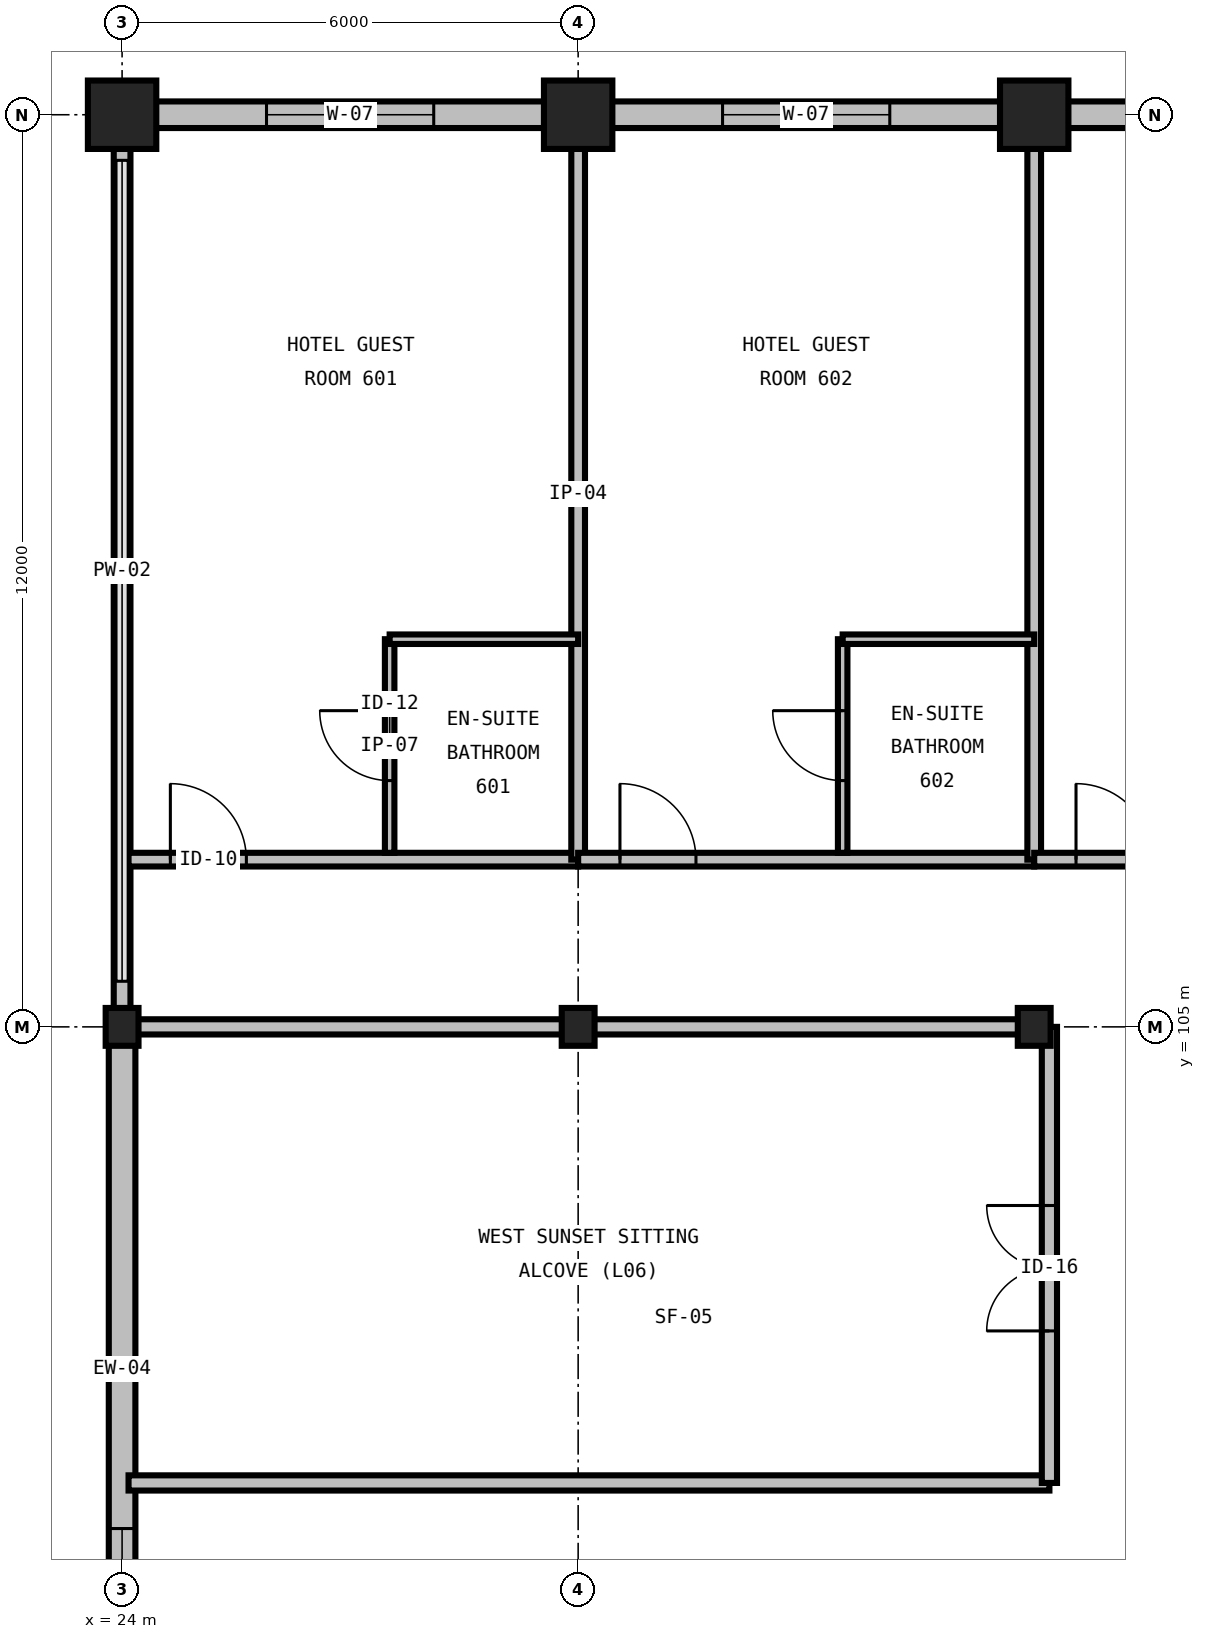
"""IFC4 building model, lengths in metres.
Left out: names, types, materials, properties, quantities, classifications, styles, units other than length and angle.
Written with IfcOpenShell. Run it as: python <this file> out.ifc"""

import sys

from ifc_helpers import new_model, si_unit, direction, frame, frame_2d, origin, origin_2d, place, context, subcontext, project, spatial, rectangle, i_section, extrude, element, fill, save


model = new_model("IFC4")
c1 = context("Model", 3, precision=1e-05, world=origin(), true_north=direction((0.0, 1.0)))
c2 = subcontext(c1, "Body", "Model", "MODEL_VIEW")
j1 = project(units=[si_unit("LENGTHUNIT", "METRE"), si_unit("PLANEANGLEUNIT", "RADIAN")], contexts=[c1])
p1 = place(None, origin())
s1 = spatial("IfcSite", under=j1, at=p1, CompositionType="ELEMENT")
p2 = place(p1, origin())
s2 = spatial("IfcBuilding", under=s1, at=p2, CompositionType="ELEMENT")
p3 = place(p2, frame((0.0, 0.0, 31.2)))
s3 = spatial("IfcBuildingStorey", under=s2, at=p3, CompositionType="ELEMENT", Elevation=31.2)
p4 = place(p3, frame((24.0, 105.0, 0.0), z_axis=(0.0, 0.0, 1.0), x_axis=(1.0, 0.0, 0.0)))
e1 = element("IfcColumn", 1, at=p4, inside=s3, PredefinedType="COLUMN", context=c2, shape_type="SweptSolid", body=[
    extrude(i_section(OverallWidth=0.432, OverallDepth=0.498, WebThickness=0.056, FlangeThickness=0.089, FilletRadius=0.031, at=origin_2d()), origin(), (0.0, 0.0, 1.0), 3.6),
])
p5 = place(p3, frame((24.0, 117.0, 0.0), z_axis=(0.0, 0.0, 1.0), x_axis=(1.0, 0.0, 0.0)))
e2 = element("IfcColumn", 2, at=p5, inside=s3, PredefinedType="COLUMN", context=c2, shape_type="SweptSolid", body=[
    extrude(rectangle(XDim=0.9, YDim=0.9, at=origin_2d()), origin(), (0.0, 0.0, 1.0), 3.6),
])
p6 = place(p3, frame((30.0, 105.0, 0.0), z_axis=(0.0, 0.0, 1.0), x_axis=(1.0, 0.0, 0.0)))
e3 = element("IfcColumn", 3, at=p6, inside=s3, PredefinedType="COLUMN", context=c2, shape_type="SweptSolid", body=[
    extrude(i_section(OverallWidth=0.432, OverallDepth=0.498, WebThickness=0.056, FlangeThickness=0.089, FilletRadius=0.031, at=origin_2d()), origin(), (0.0, 0.0, 1.0), 3.6),
])
p7 = place(p3, frame((30.0, 117.0, 0.0), z_axis=(0.0, 0.0, 1.0), x_axis=(1.0, 0.0, 0.0)))
e4 = element("IfcColumn", 4, at=p7, inside=s3, PredefinedType="COLUMN", context=c2, shape_type="SweptSolid", body=[
    extrude(rectangle(XDim=0.9, YDim=0.9, at=origin_2d()), origin(), (0.0, 0.0, 1.0), 3.6),
])
p8 = place(p3, frame((36.0, 105.0, 0.0), z_axis=(0.0, 0.0, 1.0), x_axis=(1.0, 0.0, 0.0)))
e5 = element("IfcColumn", 5, at=p8, inside=s3, PredefinedType="COLUMN", context=c2, shape_type="SweptSolid", body=[
    extrude(i_section(OverallWidth=0.432, OverallDepth=0.498, WebThickness=0.056, FlangeThickness=0.089, FilletRadius=0.031, at=origin_2d()), origin(), (0.0, 0.0, 1.0), 3.6),
])
p9 = place(p3, frame((36.0, 117.0, 0.0), z_axis=(0.0, 0.0, 1.0), x_axis=(1.0, 0.0, 0.0)))
e6 = element("IfcColumn", 6, at=p9, inside=s3, PredefinedType="COLUMN", context=c2, shape_type="SweptSolid", body=[
    extrude(rectangle(XDim=0.9, YDim=0.9, at=origin_2d()), origin(), (0.0, 0.0, 1.0), 3.6),
])
p10 = place(p3, frame((30.0, 117.0, 0.0), z_axis=(0.0, 0.0, 1.0), x_axis=(-1.0, 0.0, 0.0)))
e7 = element("IfcWall", 7, at=p10, inside=s3, PredefinedType="STANDARD", context=c2, shape_type="SweptSolid", body=[
    extrude(rectangle(XDim=6.0, YDim=0.35, at=frame_2d((3.0, 0.0))), origin(), (0.0, 0.0, 1.0), 2.486),
])
p11 = place(p10, frame((1.9, 0.0, 0.75)))
e8 = element("IfcOpeningElement", 8, at=p11, cuts=e7, PredefinedType="OPENING", context=c2, shape_type="SweptSolid", body=[
    extrude(rectangle(XDim=2.2, YDim=1.6, at=frame_2d((1.1, 0.8))), frame((0.0, 0.19, 0.0), z_axis=(0.0, -1.0, 0.0), x_axis=(1.0, 0.0, 0.0)), (0.0, 0.0, 1.0), 0.38),
])
p12 = place(p3, frame((36.0, 117.0, 0.0), z_axis=(0.0, 0.0, 1.0), x_axis=(-1.0, 0.0, 0.0)))
e9 = element("IfcWall", 9, at=p12, inside=s3, PredefinedType="STANDARD", context=c2, shape_type="SweptSolid", body=[
    extrude(rectangle(XDim=6.0, YDim=0.35, at=frame_2d((3.0, 0.0))), origin(), (0.0, 0.0, 1.0), 2.486),
])
p13 = place(p12, frame((1.9, 0.0, 0.75)))
e10 = element("IfcOpeningElement", 10, at=p13, cuts=e9, PredefinedType="OPENING", context=c2, shape_type="SweptSolid", body=[
    extrude(rectangle(XDim=2.2, YDim=1.6, at=frame_2d((1.1, 0.8))), frame((0.0, 0.19, 0.0), z_axis=(0.0, -1.0, 0.0), x_axis=(1.0, 0.0, 0.0)), (0.0, 0.0, 1.0), 0.38),
])
p14 = place(p3, frame((42.0, 117.0, 0.0), z_axis=(0.0, 0.0, 1.0), x_axis=(-1.0, 0.0, 0.0)))
e11 = element("IfcWall", 11, at=p14, inside=s3, PredefinedType="STANDARD", context=c2, shape_type="SweptSolid", body=[
    extrude(rectangle(XDim=6.0, YDim=0.35, at=frame_2d((3.0, 0.0))), origin(), (0.0, 0.0, 1.0), 2.486),
])
p15 = place(p14, frame((1.9, 0.0, 0.75)))
e12 = element("IfcOpeningElement", 12, at=p15, cuts=e11, PredefinedType="OPENING", context=c2, shape_type="SweptSolid", body=[
    extrude(rectangle(XDim=2.2, YDim=1.6, at=frame_2d((1.1, 0.8))), frame((0.0, 0.19, 0.0), z_axis=(0.0, -1.0, 0.0), x_axis=(1.0, 0.0, 0.0)), (0.0, 0.0, 1.0), 0.38),
])
p16 = place(p3, frame((24.0, 105.0, 0.0), z_axis=(0.0, 0.0, 1.0), x_axis=(0.0, -1.0, 0.0)))
e13 = element("IfcWall", 13, at=p16, inside=s3, PredefinedType="STANDARD", context=c2, shape_type="SweptSolid", body=[
    extrude(rectangle(XDim=9.0, YDim=0.35, at=frame_2d((4.5, 0.0))), origin(), (0.0, 0.0, 1.0), 2.981),
])
p17 = place(p16, frame((6.6, 0.0, 0.85)))
e14 = element("IfcOpeningElement", 14, at=p17, cuts=e13, PredefinedType="OPENING", context=c2, shape_type="SweptSolid", body=[
    extrude(rectangle(XDim=1.8, YDim=1.5, at=frame_2d((0.9, 0.75))), frame((0.0, 0.19, 0.0), z_axis=(0.0, -1.0, 0.0), x_axis=(1.0, 0.0, 0.0)), (0.0, 0.0, 1.0), 0.38),
])
p18 = place(p3, frame((24.0, 117.0, 0.0), z_axis=(0.0, 0.0, 1.0), x_axis=(0.0, -1.0, 0.0)))
e15 = element("IfcWall", 15, at=p18, inside=s3, PredefinedType="PARAPET", context=c2, shape_type="SweptSolid", body=[
    extrude(rectangle(XDim=12.0, YDim=0.22, at=frame_2d((6.0, 0.0))), origin(), (0.0, 0.0, 1.0), 0.2),
])
p19 = place(p3, frame((24.085, 107.2, 0.0), z_axis=(0.0, 0.0, 1.0), x_axis=(1.0, 0.0, 0.0)))
e16 = element("IfcWall", 16, at=p19, inside=s3, PredefinedType="PARTITIONING", context=c2, shape_type="SweptSolid", body=[
    extrude(rectangle(XDim=5.915, YDim=0.18, at=frame_2d((2.957, 0.0))), origin(), (0.0, 0.0, 1.0), 3.29),
])
p20 = place(p19, frame((0.55, 0.0, 0.0)))
e17 = element("IfcOpeningElement", 17, at=p20, cuts=e16, PredefinedType="OPENING", context=c2, shape_type="SweptSolid", body=[
    extrude(rectangle(XDim=1.0, YDim=2.15, at=frame_2d((0.5, 1.075))), frame((0.0, 0.105, 0.0), z_axis=(0.0, -1.0, 0.0), x_axis=(1.0, 0.0, 0.0)), (0.0, 0.0, 1.0), 0.21),
])
p21 = place(p3, frame((30.0, 107.2, 0.0), z_axis=(0.0, 0.0, 1.0), x_axis=(0.0, 1.0, 0.0)))
e18 = element("IfcWall", 18, at=p21, inside=s3, PredefinedType="PARTITIONING", context=c2, shape_type="SweptSolid", body=[
    extrude(rectangle(XDim=9.625, YDim=0.18, at=frame_2d((4.812, 0.0))), origin(), (0.0, 0.0, 1.0), 2.59),
])
p22 = place(p3, frame((27.52, 107.29, 0.0), z_axis=(0.0, 0.0, 1.0), x_axis=(0.0, 1.0, 0.0)))
e19 = element("IfcWall", 19, at=p22, inside=s3, PredefinedType="PARTITIONING", context=c2, shape_type="SweptSolid", body=[
    extrude(rectangle(XDim=2.81, YDim=0.125, at=frame_2d((1.405, 0.0))), origin(), (0.0, 0.0, 1.0), 3.29),
])
p23 = place(p22, frame((0.95, 0.0, 0.0)))
e20 = element("IfcOpeningElement", 20, at=p23, cuts=e19, PredefinedType="OPENING", context=c2, shape_type="SweptSolid", body=[
    extrude(rectangle(XDim=0.92, YDim=2.1, at=frame_2d((0.46, 1.05))), frame((0.0, 0.077, 0.0), z_axis=(0.0, -1.0, 0.0), x_axis=(1.0, 0.0, 0.0)), (0.0, 0.0, 1.0), 0.155),
])
p24 = place(p3, frame((27.52, 110.1, 0.0), z_axis=(0.0, 0.0, 1.0), x_axis=(1.0, 0.0, 0.0)))
e21 = element("IfcWall", 21, at=p24, inside=s3, PredefinedType="PARTITIONING", context=c2, shape_type="SweptSolid", body=[
    extrude(rectangle(XDim=2.48, YDim=0.125, at=frame_2d((1.24, 0.0))), origin(), (0.0, 0.0, 1.0), 3.29),
])
p25 = place(p3, frame((30.0, 107.2, 0.0), z_axis=(0.0, 0.0, 1.0), x_axis=(1.0, 0.0, 0.0)))
e22 = element("IfcWall", 22, at=p25, inside=s3, PredefinedType="PARTITIONING", context=c2, shape_type="SweptSolid", body=[
    extrude(rectangle(XDim=6.0, YDim=0.18, at=frame_2d((3.0, 0.0))), origin(), (0.0, 0.0, 1.0), 3.29),
])
p26 = place(p25, frame((0.55, 0.0, 0.0)))
e23 = element("IfcOpeningElement", 23, at=p26, cuts=e22, PredefinedType="OPENING", context=c2, shape_type="SweptSolid", body=[
    extrude(rectangle(XDim=1.0, YDim=2.15, at=frame_2d((0.5, 1.075))), frame((0.0, 0.105, 0.0), z_axis=(0.0, -1.0, 0.0), x_axis=(1.0, 0.0, 0.0)), (0.0, 0.0, 1.0), 0.21),
])
p27 = place(p3, frame((36.0, 107.2, 0.0), z_axis=(0.0, 0.0, 1.0), x_axis=(0.0, 1.0, 0.0)))
e24 = element("IfcWall", 24, at=p27, inside=s3, PredefinedType="PARTITIONING", context=c2, shape_type="SweptSolid", body=[
    extrude(rectangle(XDim=9.625, YDim=0.18, at=frame_2d((4.812, 0.0))), origin(), (0.0, 0.0, 1.0), 2.59),
])
p28 = place(p3, frame((33.48, 107.29, 0.0), z_axis=(0.0, 0.0, 1.0), x_axis=(0.0, 1.0, 0.0)))
e25 = element("IfcWall", 25, at=p28, inside=s3, PredefinedType="PARTITIONING", context=c2, shape_type="SweptSolid", body=[
    extrude(rectangle(XDim=2.81, YDim=0.125, at=frame_2d((1.405, 0.0))), origin(), (0.0, 0.0, 1.0), 3.29),
])
p29 = place(p28, frame((0.95, 0.0, 0.0)))
e26 = element("IfcOpeningElement", 26, at=p29, cuts=e25, PredefinedType="OPENING", context=c2, shape_type="SweptSolid", body=[
    extrude(rectangle(XDim=0.92, YDim=2.1, at=frame_2d((0.46, 1.05))), frame((0.0, 0.077, 0.0), z_axis=(0.0, -1.0, 0.0), x_axis=(1.0, 0.0, 0.0)), (0.0, 0.0, 1.0), 0.155),
])
p30 = place(p3, frame((33.48, 110.1, 0.0), z_axis=(0.0, 0.0, 1.0), x_axis=(1.0, 0.0, 0.0)))
e27 = element("IfcWall", 27, at=p30, inside=s3, PredefinedType="PARTITIONING", context=c2, shape_type="SweptSolid", body=[
    extrude(rectangle(XDim=2.52, YDim=0.125, at=frame_2d((1.26, 0.0))), origin(), (0.0, 0.0, 1.0), 3.29),
])
p31 = place(p3, frame((36.0, 107.2, 0.0), z_axis=(0.0, 0.0, 1.0), x_axis=(1.0, 0.0, 0.0)))
e28 = element("IfcWall", 28, at=p31, inside=s3, PredefinedType="PARTITIONING", context=c2, shape_type="SweptSolid", body=[
    extrude(rectangle(XDim=6.0, YDim=0.18, at=frame_2d((3.0, 0.0))), origin(), (0.0, 0.0, 1.0), 3.29),
])
p32 = place(p31, frame((0.55, 0.0, 0.0)))
e29 = element("IfcOpeningElement", 29, at=p32, cuts=e28, PredefinedType="OPENING", context=c2, shape_type="SweptSolid", body=[
    extrude(rectangle(XDim=1.0, YDim=2.15, at=frame_2d((0.5, 1.075))), frame((0.0, 0.105, 0.0), z_axis=(0.0, -1.0, 0.0), x_axis=(1.0, 0.0, 0.0)), (0.0, 0.0, 1.0), 0.21),
])
p33 = place(p3, frame((24.085, 99.0, 0.0), z_axis=(0.0, 0.0, 1.0), x_axis=(1.0, 0.0, 0.0)))
e30 = element("IfcWall", 30, at=p33, inside=s3, PredefinedType="PARTITIONING", context=c2, shape_type="SweptSolid", body=[
    extrude(rectangle(XDim=12.115, YDim=0.2, at=frame_2d((6.057, 0.0))), origin(), (0.0, 0.0, 1.0), 3.29),
])
p34 = place(p3, frame((36.2, 99.0, 0.0), z_axis=(0.0, 0.0, 1.0), x_axis=(0.0, 1.0, 0.0)))
e31 = element("IfcWall", 31, at=p34, inside=s3, PredefinedType="PARTITIONING", context=c2, shape_type="SweptSolid", body=[
    extrude(rectangle(XDim=6.0, YDim=0.2, at=frame_2d((3.0, 0.0))), origin(), (0.0, 0.0, 1.0), 3.29),
])
p35 = place(p34, frame((2.0, 0.0, 0.0)))
e32 = element("IfcOpeningElement", 32, at=p35, cuts=e31, PredefinedType="OPENING", context=c2, shape_type="SweptSolid", body=[
    extrude(rectangle(XDim=1.65, YDim=2.25, at=frame_2d((0.825, 1.125))), frame((0.0, 0.115, 0.0), z_axis=(0.0, -1.0, 0.0), x_axis=(1.0, 0.0, 0.0)), (0.0, 0.0, 1.0), 0.23),
])
p36 = place(p3, frame((36.2, 105.0, 0.0), z_axis=(0.0, 0.0, 1.0), x_axis=(-1.0, 0.0, 0.0)))
e33 = element("IfcWall", 33, at=p36, inside=s3, PredefinedType="PARTITIONING", context=c2, shape_type="SweptSolid", body=[
    extrude(rectangle(XDim=12.115, YDim=0.2, at=frame_2d((6.057, 0.0))), origin(), (0.0, 0.0, 1.0), 2.736),
])
p37 = place(p11, origin())
e34 = element("IfcWindow", 34, at=p37, inside=s3, PartitioningType="DOUBLE_PANEL_VERTICAL", PredefinedType="WINDOW", context=c2, shape_type="SweptSolid", body=[
    extrude(rectangle(XDim=2.2, YDim=1.6, at=frame_2d((1.1, 0.8))), frame((0.0, 0.03, 0.0), z_axis=(0.0, -1.0, 0.0), x_axis=(1.0, 0.0, 0.0)), (0.0, 0.0, 1.0), 0.06),
])
fill(e8, e34)
p38 = place(p13, origin())
e35 = element("IfcWindow", 35, at=p38, inside=s3, PartitioningType="DOUBLE_PANEL_VERTICAL", PredefinedType="WINDOW", context=c2, shape_type="SweptSolid", body=[
    extrude(rectangle(XDim=2.2, YDim=1.6, at=frame_2d((1.1, 0.8))), frame((0.0, 0.03, 0.0), z_axis=(0.0, -1.0, 0.0), x_axis=(1.0, 0.0, 0.0)), (0.0, 0.0, 1.0), 0.06),
])
fill(e10, e35)
p39 = place(p17, origin())
e36 = element("IfcWindow", 36, at=p39, inside=s3, PartitioningType="SINGLE_PANEL", PredefinedType="WINDOW", context=c2, shape_type="SweptSolid", body=[
    extrude(rectangle(XDim=1.8, YDim=1.5, at=frame_2d((0.9, 0.75))), frame((0.0, 0.03, 0.0), z_axis=(0.0, -1.0, 0.0), x_axis=(1.0, 0.0, 0.0)), (0.0, 0.0, 1.0), 0.06),
])
fill(e14, e36)
p40 = place(p20, origin())
e37 = element("IfcDoor", 37, at=p40, inside=s3, OperationType="SINGLE_SWING_LEFT", PredefinedType="DOOR", context=c2, shape_type="SweptSolid", body=[
    extrude(rectangle(XDim=1.0, YDim=2.15, at=frame_2d((0.5, 1.075))), frame((0.0, 0.025, 0.0), z_axis=(0.0, -1.0, 0.0), x_axis=(1.0, 0.0, 0.0)), (0.0, 0.0, 1.0), 0.05),
])
fill(e17, e37)
p41 = place(p23, origin())
e38 = element("IfcDoor", 38, at=p41, inside=s3, OperationType="SINGLE_SWING_RIGHT", PredefinedType="DOOR", context=c2, shape_type="SweptSolid", body=[
    extrude(rectangle(XDim=0.92, YDim=2.1, at=frame_2d((0.46, 1.05))), frame((0.0, 0.025, 0.0), z_axis=(0.0, -1.0, 0.0), x_axis=(1.0, 0.0, 0.0)), (0.0, 0.0, 1.0), 0.05),
])
fill(e20, e38)
p42 = place(p26, origin())
e39 = element("IfcDoor", 39, at=p42, inside=s3, OperationType="SINGLE_SWING_LEFT", PredefinedType="DOOR", context=c2, shape_type="SweptSolid", body=[
    extrude(rectangle(XDim=1.0, YDim=2.15, at=frame_2d((0.5, 1.075))), frame((0.0, 0.025, 0.0), z_axis=(0.0, -1.0, 0.0), x_axis=(1.0, 0.0, 0.0)), (0.0, 0.0, 1.0), 0.05),
])
fill(e23, e39)
p43 = place(p29, origin())
e40 = element("IfcDoor", 40, at=p43, inside=s3, OperationType="SINGLE_SWING_RIGHT", PredefinedType="DOOR", context=c2, shape_type="SweptSolid", body=[
    extrude(rectangle(XDim=0.92, YDim=2.1, at=frame_2d((0.46, 1.05))), frame((0.0, 0.025, 0.0), z_axis=(0.0, -1.0, 0.0), x_axis=(1.0, 0.0, 0.0)), (0.0, 0.0, 1.0), 0.05),
])
fill(e26, e40)
p44 = place(p32, origin())
e41 = element("IfcDoor", 41, at=p44, inside=s3, OperationType="SINGLE_SWING_LEFT", PredefinedType="DOOR", context=c2, shape_type="SweptSolid", body=[
    extrude(rectangle(XDim=1.0, YDim=2.15, at=frame_2d((0.5, 1.075))), frame((0.0, 0.025, 0.0), z_axis=(0.0, -1.0, 0.0), x_axis=(1.0, 0.0, 0.0)), (0.0, 0.0, 1.0), 0.05),
])
fill(e29, e41)
p45 = place(p35, origin())
e42 = element("IfcDoor", 42, at=p45, inside=s3, OperationType="DOUBLE_DOOR_SINGLE_SWING", PredefinedType="DOOR", context=c2, shape_type="SweptSolid", body=[
    extrude(rectangle(XDim=1.65, YDim=2.25, at=frame_2d((0.825, 1.125))), frame((0.0, 0.025, 0.0), z_axis=(0.0, -1.0, 0.0), x_axis=(1.0, 0.0, 0.0)), (0.0, 0.0, 1.0), 0.05),
])
fill(e32, e42)
save(model, sys.argv[1])
